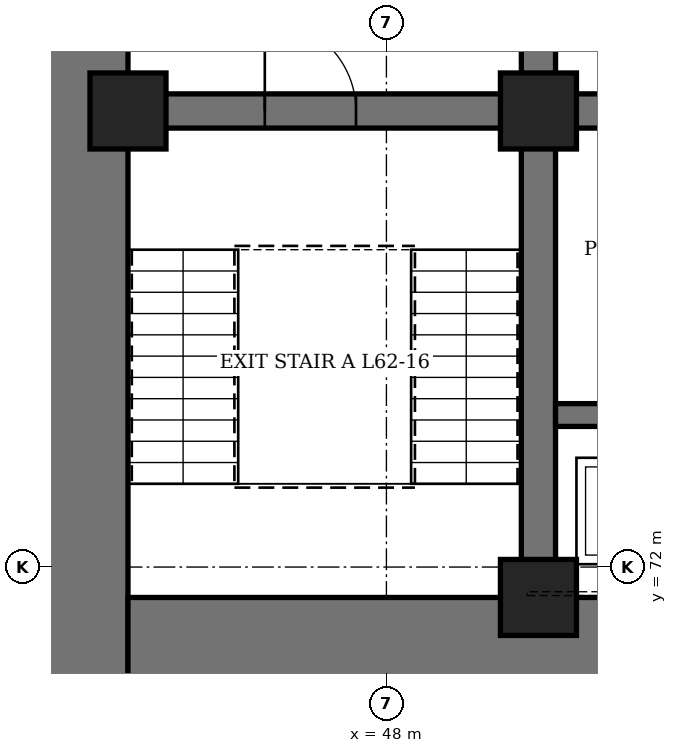
"""IFC4 building model, lengths in metres.
Left out: names, types, materials, properties, quantities, classifications, styles, units other than length and angle.
Written with IfcOpenShell. Run it as: python <this file> out.ifc"""

import sys

from ifc_helpers import new_model, si_unit, direction, frame, frame_2d, origin, origin_2d, place, context, subcontext, project, spatial, rectangle, hollow_rectangle, extrude, element, fill, save


model = new_model("IFC4")
c1 = context("Model", 3, precision=1e-05, world=origin(), true_north=direction((0.0, 1.0)))
c2 = subcontext(c1, "Body", "Model", "MODEL_VIEW")
j1 = project(units=[si_unit("LENGTHUNIT", "METRE"), si_unit("PLANEANGLEUNIT", "RADIAN")], contexts=[c1])
p1 = place(None, origin())
s1 = spatial("IfcSite", under=j1, at=p1, CompositionType="ELEMENT")
p2 = place(p1, origin())
s2 = spatial("IfcBuilding", under=s1, at=p2, CompositionType="ELEMENT")
p3 = place(p2, frame((0.0, 0.0, 275.5)))
s3 = spatial("IfcBuildingStorey", under=s2, at=p3, CompositionType="ELEMENT", Elevation=275.5)
p4 = place(p3, frame((44.0, 70.4, 0.0), z_axis=(0.0, 0.0, 1.0), x_axis=(0.0, 1.0, 0.0)))
e1 = element("IfcWall", 1, at=p4, inside=s3, PredefinedType="SHEAR", context=c2, shape_type="SweptSolid", body=[
    extrude(rectangle(XDim=19.2, YDim=1.2, at=frame_2d((9.6, 0.0))), origin(), (0.0, 0.0, 1.0), 4.2),
])
p5 = place(p4, frame((8.6, 0.0, 0.0)))
e2 = element("IfcOpeningElement", 2, at=p5, cuts=e1, PredefinedType="OPENING", context=c2, shape_type="SweptSolid", body=[
    extrude(rectangle(XDim=2.0, YDim=2.4, at=frame_2d((1.0, 1.2))), frame((0.0, 0.61, 0.0), z_axis=(0.0, -1.0, 0.0), x_axis=(1.0, 0.0, 0.0)), (0.0, 0.0, 1.0), 1.22),
])
p6 = place(p3, frame((44.6, 71.0, 0.0), z_axis=(0.0, 0.0, 1.0), x_axis=(1.0, 0.0, 0.0)))
e3 = element("IfcWall", 3, at=p6, inside=s3, PredefinedType="SHEAR", context=c2, shape_type="SweptSolid", body=[
    extrude(rectangle(XDim=22.8, YDim=1.2, at=frame_2d((11.4, 0.0))), origin(), (0.0, 0.0, 1.0), 4.2),
])
p7 = place(p6, frame((6.35, 0.0, 0.0)))
e4 = element("IfcOpeningElement", 4, at=p7, cuts=e3, PredefinedType="OPENING", context=c2, shape_type="SweptSolid", body=[
    extrude(rectangle(XDim=1.1, YDim=2.2, at=frame_2d((0.55, 1.1))), frame((0.0, 0.61, 0.0), z_axis=(0.0, -1.0, 0.0), x_axis=(1.0, 0.0, 0.0)), (0.0, 0.0, 1.0), 1.22),
])
p8 = place(p6, frame((9.35, 0.0, 0.0)))
e5 = element("IfcOpeningElement", 5, at=p8, cuts=e3, PredefinedType="OPENING", context=c2, shape_type="SweptSolid", body=[
    extrude(rectangle(XDim=1.1, YDim=2.2, at=frame_2d((0.55, 1.1))), frame((0.0, 0.61, 0.0), z_axis=(0.0, -1.0, 0.0), x_axis=(1.0, 0.0, 0.0)), (0.0, 0.0, 1.0), 1.22),
])
p9 = place(p6, frame((12.35, 0.0, 0.0)))
e6 = element("IfcOpeningElement", 6, at=p9, cuts=e3, PredefinedType="OPENING", context=c2, shape_type="SweptSolid", body=[
    extrude(rectangle(XDim=1.1, YDim=2.2, at=frame_2d((0.55, 1.1))), frame((0.0, 0.61, 0.0), z_axis=(0.0, -1.0, 0.0), x_axis=(1.0, 0.0, 0.0)), (0.0, 0.0, 1.0), 1.22),
])
p10 = place(p6, frame((15.35, 0.0, 0.0)))
e7 = element("IfcOpeningElement", 7, at=p10, cuts=e3, PredefinedType="OPENING", context=c2, shape_type="SweptSolid", body=[
    extrude(rectangle(XDim=1.1, YDim=2.2, at=frame_2d((0.55, 1.1))), frame((0.0, 0.61, 0.0), z_axis=(0.0, -1.0, 0.0), x_axis=(1.0, 0.0, 0.0)), (0.0, 0.0, 1.0), 1.22),
])
p11 = place(p3, frame((50.0, 71.6, 0.0), z_axis=(0.0, 0.0, 1.0), x_axis=(0.0, 1.0, 0.0)))
e8 = element("IfcWall", 8, at=p11, inside=s3, PredefinedType="SHEAR", context=c2, shape_type="SweptSolid", body=[
    extrude(rectangle(XDim=16.8, YDim=0.45, at=frame_2d((8.4, 0.0))), origin(), (0.0, 0.0, 1.0), 4.2),
])
p12 = place(p11, frame((7.5, 0.0, 0.0)))
e9 = element("IfcOpeningElement", 9, at=p12, cuts=e8, PredefinedType="OPENING", context=c2, shape_type="SweptSolid", body=[
    extrude(rectangle(XDim=1.8, YDim=2.4, at=frame_2d((0.9, 1.2))), frame((0.0, 0.235, 0.0), z_axis=(0.0, -1.0, 0.0), x_axis=(1.0, 0.0, 0.0)), (0.0, 0.0, 1.0), 0.47),
])
p13 = place(p3, frame((44.6, 78.0, 0.0), z_axis=(0.0, 0.0, 1.0), x_axis=(1.0, 0.0, 0.0)))
e10 = element("IfcWall", 10, at=p13, inside=s3, PredefinedType="SHEAR", context=c2, shape_type="SweptSolid", body=[
    extrude(rectangle(XDim=5.175, YDim=0.45, at=frame_2d((2.587, 0.0))), origin(), (0.0, 0.0, 1.0), 4.2),
])
p14 = place(p13, frame((1.8, 0.0, 0.0)))
e11 = element("IfcOpeningElement", 11, at=p14, cuts=e10, PredefinedType="OPENING", context=c2, shape_type="SweptSolid", body=[
    extrude(rectangle(XDim=1.2, YDim=2.1, at=frame_2d((0.6, 1.05))), frame((0.0, 0.235, 0.0), z_axis=(0.0, -1.0, 0.0), x_axis=(1.0, 0.0, 0.0)), (0.0, 0.0, 1.0), 0.47),
])
p15 = place(p3, frame((50.225, 78.0, 0.0), z_axis=(0.0, 0.0, 1.0), x_axis=(1.0, 0.0, 0.0)))
e12 = element("IfcWall", 12, at=p15, inside=s3, PredefinedType="SHEAR", context=c2, shape_type="SweptSolid", body=[
    extrude(rectangle(XDim=11.55, YDim=0.45, at=frame_2d((5.775, 0.0))), origin(), (0.0, 0.0, 1.0), 4.2),
])
p16 = place(p15, frame((0.825, 0.0, 0.0)))
e13 = element("IfcOpeningElement", 13, at=p16, cuts=e12, PredefinedType="OPENING", context=c2, shape_type="SweptSolid", body=[
    extrude(rectangle(XDim=0.9, YDim=2.1, at=frame_2d((0.45, 1.05))), frame((0.0, 0.235, 0.0), z_axis=(0.0, -1.0, 0.0), x_axis=(1.0, 0.0, 0.0)), (0.0, 0.0, 1.0), 0.47),
])
p17 = place(p15, frame((3.825, 0.0, 0.0)))
e14 = element("IfcOpeningElement", 14, at=p17, cuts=e12, PredefinedType="OPENING", context=c2, shape_type="SweptSolid", body=[
    extrude(rectangle(XDim=0.9, YDim=2.1, at=frame_2d((0.45, 1.05))), frame((0.0, 0.235, 0.0), z_axis=(0.0, -1.0, 0.0), x_axis=(1.0, 0.0, 0.0)), (0.0, 0.0, 1.0), 0.47),
])
p18 = place(p15, frame((6.825, 0.0, 0.0)))
e15 = element("IfcOpeningElement", 15, at=p18, cuts=e12, PredefinedType="OPENING", context=c2, shape_type="SweptSolid", body=[
    extrude(rectangle(XDim=0.9, YDim=2.1, at=frame_2d((0.45, 1.05))), frame((0.0, 0.235, 0.0), z_axis=(0.0, -1.0, 0.0), x_axis=(1.0, 0.0, 0.0)), (0.0, 0.0, 1.0), 0.47),
])
p19 = place(p15, frame((9.825, 0.0, 0.0)))
e16 = element("IfcOpeningElement", 16, at=p19, cuts=e12, PredefinedType="OPENING", context=c2, shape_type="SweptSolid", body=[
    extrude(rectangle(XDim=0.9, YDim=2.1, at=frame_2d((0.45, 1.05))), frame((0.0, 0.235, 0.0), z_axis=(0.0, -1.0, 0.0), x_axis=(1.0, 0.0, 0.0)), (0.0, 0.0, 1.0), 0.47),
])
p20 = place(p3, frame((50.225, 74.0, 0.0), z_axis=(0.0, 0.0, 1.0), x_axis=(1.0, 0.0, 0.0)))
e17 = element("IfcWall", 17, at=p20, inside=s3, PredefinedType="SHEAR", context=c2, shape_type="SweptSolid", body=[
    extrude(rectangle(XDim=11.55, YDim=0.3, at=frame_2d((5.775, 0.0))), origin(), (0.0, 0.0, 1.0), 4.2),
])
for number, where, z_axis, x_axis in (
    (18, (44.6, 78.0, 0.0), (0.0, 0.0, 1.0), (1.0, 0.0, 0.0)),
    (19, (50.0, 71.6, 0.0), (0.0, 0.0, 1.0), (1.0, 0.0, 0.0)),
    (20, (50.0, 78.0, 0.0), (0.0, 0.0, 1.0), (1.0, 0.0, 0.0)),
):
    element("IfcColumn", number, at=place(p3, frame(where, z_axis=z_axis, x_axis=x_axis)), inside=s3, PredefinedType="COLUMN", context=c2, shape_type="SweptSolid", body=[
        extrude(hollow_rectangle(XDim=1.0, YDim=1.0, WallThickness=0.15, at=origin_2d()), origin(), (0.0, 0.0, 1.0), 4.2),
    ])
p21 = place(p14, origin())
e21 = element("IfcDoor", 21, at=p21, inside=s3, OperationType="SINGLE_SWING_LEFT", PredefinedType="DOOR", context=c2, shape_type="SweptSolid", body=[
    extrude(rectangle(XDim=1.2, YDim=2.1, at=frame_2d((0.6, 1.05))), frame((0.0, 0.225, 0.0), z_axis=(0.0, -1.0, 0.0), x_axis=(1.0, 0.0, 0.0)), (0.0, 0.0, 1.0), 0.449),
])
fill(e11, e21)
save(model, sys.argv[1])
